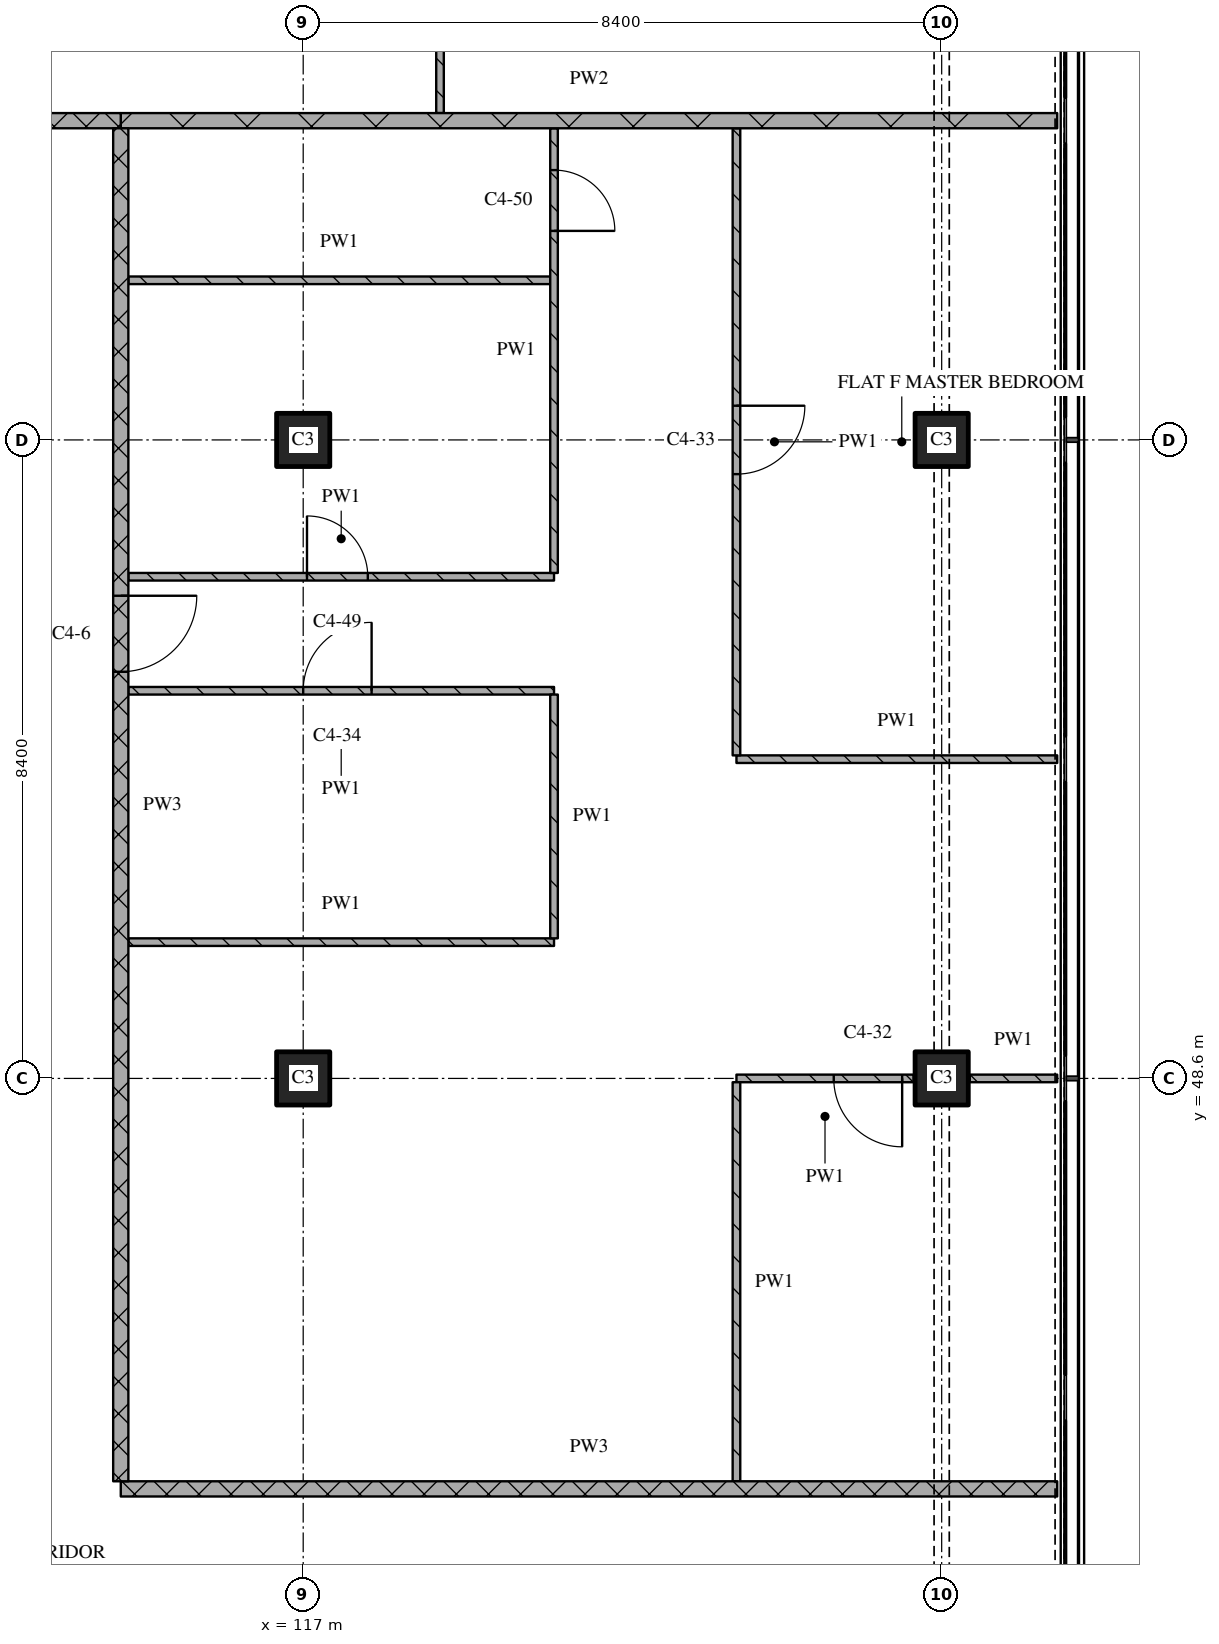
"""IFC4 building model, lengths in metres.
Left out: names, types, materials, properties, quantities, classifications, styles, units other than length and angle.
Written with IfcOpenShell. Run it as: python <this file> out.ifc"""

import sys

from ifc_helpers import new_model, si_unit, direction, frame, frame_2d, origin, origin_2d, place, context, subcontext, project, spatial, rectangle, extrude, element, fill, save


model = new_model("IFC4")
c1 = context("Model", 3, precision=1e-05, world=origin(), true_north=direction((0.0, 1.0)))
c2 = subcontext(c1, "Body", "Model", "MODEL_VIEW")
j1 = project(units=[si_unit("LENGTHUNIT", "METRE"), si_unit("PLANEANGLEUNIT", "RADIAN")], contexts=[c1])
p1 = place(None, origin())
s1 = spatial("IfcSite", under=j1, at=p1, CompositionType="ELEMENT")
p2 = place(p1, origin())
s2 = spatial("IfcBuilding", under=s1, at=p2, CompositionType="ELEMENT")
p3 = place(p2, frame((0.0, 0.0, 183.45)))
s3 = spatial("IfcBuildingStorey", under=s2, at=p3, CompositionType="ELEMENT", Elevation=183.45)
for number, where, z_axis, x_axis in (
    (1, (117.0, 48.6, 0.0), (0.0, 0.0, 1.0), (1.0, 0.0, 0.0)),
    (2, (117.0, 57.0, 0.0), (0.0, 0.0, 1.0), (1.0, 0.0, 0.0)),
    (3, (125.4, 48.6, 0.0), (0.0, 0.0, 1.0), (1.0, 0.0, 0.0)),
    (4, (125.4, 57.0, 0.0), (0.0, 0.0, 1.0), (1.0, 0.0, 0.0)),
):
    element("IfcColumn", number, at=place(p3, frame(where, z_axis=z_axis, x_axis=x_axis)), inside=s3, PredefinedType="COLUMN", context=c2, shape_type="SweptSolid", body=[
        extrude(rectangle(XDim=0.7, YDim=0.7, at=origin_2d()), origin(), (0.0, 0.0, 1.0), 3.6),
    ])
p4 = place(p3, frame((114.6, 43.2, 0.0), z_axis=(0.0, 0.0, 1.0), x_axis=(1.0, 0.0, 0.0)))
e5 = element("IfcWall", 5, at=p4, inside=s3, PredefinedType="PARTITIONING", context=c2, shape_type="SweptSolid", body=[
    extrude(rectangle(XDim=12.32, YDim=0.2, at=frame_2d((6.16, 0.0))), origin(), (0.0, 0.0, 1.0), 3.32),
])
p5 = place(p3, frame((125.03, 48.6, 0.0), z_axis=(0.0, 0.0, 1.0), x_axis=(-1.0, 0.0, 0.0)))
e6 = element("IfcWall", 6, at=p5, inside=s3, PredefinedType="PARTITIONING", context=c2, shape_type="SweptSolid", body=[
    extrude(rectangle(XDim=2.33, YDim=0.1, at=frame_2d((1.165, 0.0))), origin(), (0.0, 0.0, 1.0), 3.32),
])
p6 = place(p5, frame((0.15, 0.0, 0.0)))
e7 = element("IfcOpeningElement", 7, at=p6, cuts=e6, PredefinedType="OPENING", context=c2, shape_type="SweptSolid", body=[
    extrude(rectangle(XDim=0.9, YDim=2.1, at=frame_2d((0.45, 1.05))), frame((0.0, 0.06, 0.0), z_axis=(0.0, -1.0, 0.0), x_axis=(1.0, 0.0, 0.0)), (0.0, 0.0, 1.0), 0.12),
])
p7 = place(p3, frame((125.77, 48.6, 0.0), z_axis=(0.0, 0.0, 1.0), x_axis=(1.0, 0.0, 0.0)))
e8 = element("IfcWall", 8, at=p7, inside=s3, PredefinedType="PARTITIONING", context=c2, shape_type="SweptSolid", body=[
    extrude(rectangle(XDim=1.15, YDim=0.1, at=frame_2d((0.575, 0.0))), origin(), (0.0, 0.0, 1.0), 3.32),
])
p8 = place(p3, frame((114.7, 50.393, 0.0), z_axis=(0.0, 0.0, 1.0), x_axis=(1.0, 0.0, 0.0)))
e9 = element("IfcWall", 9, at=p8, inside=s3, PredefinedType="PARTITIONING", context=c2, shape_type="SweptSolid", body=[
    extrude(rectangle(XDim=5.6, YDim=0.1, at=frame_2d((2.8, 0.0))), origin(), (0.0, 0.0, 1.0), 3.32),
])
p9 = place(p3, frame((122.7, 52.8, 0.0), z_axis=(0.0, 0.0, 1.0), x_axis=(1.0, 0.0, 0.0)))
e10 = element("IfcWall", 10, at=p9, inside=s3, PredefinedType="PARTITIONING", context=c2, shape_type="SweptSolid", body=[
    extrude(rectangle(XDim=4.22, YDim=0.1, at=frame_2d((2.11, 0.0))), origin(), (0.0, 0.0, 1.0), 3.32),
])
p10 = place(p3, frame((120.3, 53.7, 0.0), z_axis=(0.0, 0.0, 1.0), x_axis=(-1.0, 0.0, 0.0)))
e11 = element("IfcWall", 11, at=p10, inside=s3, PredefinedType="PARTITIONING", context=c2, shape_type="SweptSolid", body=[
    extrude(rectangle(XDim=5.6, YDim=0.1, at=frame_2d((2.8, 0.0))), origin(), (0.0, 0.0, 1.0), 3.32),
])
p11 = place(p10, frame((2.4, 0.0, 0.0)))
e12 = element("IfcOpeningElement", 12, at=p11, cuts=e11, PredefinedType="OPENING", context=c2, shape_type="SweptSolid", body=[
    extrude(rectangle(XDim=0.9, YDim=2.1, at=frame_2d((0.45, 1.05))), frame((0.0, 0.06, 0.0), z_axis=(0.0, -1.0, 0.0), x_axis=(1.0, 0.0, 0.0)), (0.0, 0.0, 1.0), 0.12),
])
p12 = place(p3, frame((114.7, 55.2, 0.0), z_axis=(0.0, 0.0, 1.0), x_axis=(1.0, 0.0, 0.0)))
e13 = element("IfcWall", 13, at=p12, inside=s3, PredefinedType="PARTITIONING", context=c2, shape_type="SweptSolid", body=[
    extrude(rectangle(XDim=5.6, YDim=0.1, at=frame_2d((2.8, 0.0))), origin(), (0.0, 0.0, 1.0), 3.32),
])
p13 = place(p12, frame((2.35, 0.0, 0.0)))
e14 = element("IfcOpeningElement", 14, at=p13, cuts=e13, PredefinedType="OPENING", context=c2, shape_type="SweptSolid", body=[
    extrude(rectangle(XDim=0.8, YDim=2.1, at=frame_2d((0.4, 1.05))), frame((0.0, 0.06, 0.0), z_axis=(0.0, -1.0, 0.0), x_axis=(1.0, 0.0, 0.0)), (0.0, 0.0, 1.0), 0.12),
])
p14 = place(p3, frame((114.7, 59.1, 0.0), z_axis=(0.0, 0.0, 1.0), x_axis=(1.0, 0.0, 0.0)))
e15 = element("IfcWall", 15, at=p14, inside=s3, PredefinedType="PARTITIONING", context=c2, shape_type="SweptSolid", body=[
    extrude(rectangle(XDim=5.55, YDim=0.1, at=frame_2d((2.775, 0.0))), origin(), (0.0, 0.0, 1.0), 3.32),
])
p15 = place(p3, frame((111.0, 61.2, 0.0), z_axis=(0.0, 0.0, 1.0), x_axis=(1.0, 0.0, 0.0)))
e16 = element("IfcWall", 16, at=p15, inside=s3, PredefinedType="PARTITIONING", context=c2, shape_type="SweptSolid", body=[
    extrude(rectangle(XDim=3.6, YDim=0.2, at=frame_2d((1.8, 0.0))), origin(), (0.0, 0.0, 1.0), 3.32),
])
p16 = place(p3, frame((114.6, 61.2, 0.0), z_axis=(0.0, 0.0, 1.0), x_axis=(1.0, 0.0, 0.0)))
e17 = element("IfcWall", 17, at=p16, inside=s3, PredefinedType="PARTITIONING", context=c2, shape_type="SweptSolid", body=[
    extrude(rectangle(XDim=12.32, YDim=0.2, at=frame_2d((6.16, 0.0))), origin(), (0.0, 0.0, 1.0), 3.32),
])
p17 = place(p3, frame((114.6, 61.1, 0.0), z_axis=(0.0, 0.0, 1.0), x_axis=(0.0, -1.0, 0.0)))
e18 = element("IfcWall", 18, at=p17, inside=s3, PredefinedType="PARTITIONING", context=c2, shape_type="SweptSolid", body=[
    extrude(rectangle(XDim=17.8, YDim=0.2, at=frame_2d((8.9, 0.0))), origin(), (0.0, 0.0, 1.0), 3.32),
])
p18 = place(p17, frame((6.15, 0.0, 0.0)))
e19 = element("IfcOpeningElement", 19, at=p18, cuts=e18, PredefinedType="OPENING", context=c2, shape_type="SweptSolid", body=[
    extrude(rectangle(XDim=1.0, YDim=2.1, at=frame_2d((0.5, 1.05))), frame((0.0, 0.11, 0.0), z_axis=(0.0, -1.0, 0.0), x_axis=(1.0, 0.0, 0.0)), (0.0, 0.0, 1.0), 0.22),
])
p19 = place(p3, frame((118.8, 61.3, 0.0), z_axis=(0.0, 0.0, 1.0), x_axis=(0.0, 1.0, 0.0)))
e20 = element("IfcWall", 20, at=p19, inside=s3, PredefinedType="PARTITIONING", context=c2, shape_type="SweptSolid", body=[
    extrude(rectangle(XDim=3.15, YDim=0.1, at=frame_2d((1.575, 0.0))), origin(), (0.0, 0.0, 1.0), 3.32),
])
p20 = place(p19, frame((1.15, 0.0, 0.0)))
e21 = element("IfcOpeningElement", 21, at=p20, cuts=e20, PredefinedType="OPENING", context=c2, shape_type="SweptSolid", body=[
    extrude(rectangle(XDim=0.8, YDim=2.1, at=frame_2d((0.4, 1.05))), frame((0.0, 0.06, 0.0), z_axis=(0.0, -1.0, 0.0), x_axis=(1.0, 0.0, 0.0)), (0.0, 0.0, 1.0), 0.12),
])
p21 = place(p3, frame((120.3, 53.65, 0.0), z_axis=(0.0, 0.0, 1.0), x_axis=(0.0, -1.0, 0.0)))
e22 = element("IfcWall", 22, at=p21, inside=s3, PredefinedType="PARTITIONING", context=c2, shape_type="SweptSolid", body=[
    extrude(rectangle(XDim=3.207, YDim=0.1, at=frame_2d((1.604, 0.0))), origin(), (0.0, 0.0, 1.0), 3.32),
])
p22 = place(p3, frame((120.3, 55.25, 0.0), z_axis=(0.0, 0.0, 1.0), x_axis=(0.0, 1.0, 0.0)))
e23 = element("IfcWall", 23, at=p22, inside=s3, PredefinedType="PARTITIONING", context=c2, shape_type="SweptSolid", body=[
    extrude(rectangle(XDim=5.85, YDim=0.1, at=frame_2d((2.925, 0.0))), origin(), (0.0, 0.0, 1.0), 3.32),
])
p23 = place(p22, frame((4.5, 0.0, 0.0)))
e24 = element("IfcOpeningElement", 24, at=p23, cuts=e23, PredefinedType="OPENING", context=c2, shape_type="SweptSolid", body=[
    extrude(rectangle(XDim=0.8, YDim=2.1, at=frame_2d((0.4, 1.05))), frame((0.0, 0.06, 0.0), z_axis=(0.0, -1.0, 0.0), x_axis=(1.0, 0.0, 0.0)), (0.0, 0.0, 1.0), 0.12),
])
p24 = place(p3, frame((122.7, 48.55, 0.0), z_axis=(0.0, 0.0, 1.0), x_axis=(0.0, -1.0, 0.0)))
e25 = element("IfcWall", 25, at=p24, inside=s3, PredefinedType="PARTITIONING", context=c2, shape_type="SweptSolid", body=[
    extrude(rectangle(XDim=5.25, YDim=0.1, at=frame_2d((2.625, 0.0))), origin(), (0.0, 0.0, 1.0), 3.32),
])
p25 = place(p3, frame((122.7, 61.1, 0.0), z_axis=(0.0, 0.0, 1.0), x_axis=(0.0, -1.0, 0.0)))
e26 = element("IfcWall", 26, at=p25, inside=s3, PredefinedType="PARTITIONING", context=c2, shape_type="SweptSolid", body=[
    extrude(rectangle(XDim=8.25, YDim=0.1, at=frame_2d((4.125, 0.0))), origin(), (0.0, 0.0, 1.0), 3.32),
])
p26 = place(p25, frame((3.65, 0.0, 0.0)))
e27 = element("IfcOpeningElement", 27, at=p26, cuts=e26, PredefinedType="OPENING", context=c2, shape_type="SweptSolid", body=[
    extrude(rectangle(XDim=0.9, YDim=2.1, at=frame_2d((0.45, 1.05))), frame((0.0, 0.06, 0.0), z_axis=(0.0, -1.0, 0.0), x_axis=(1.0, 0.0, 0.0)), (0.0, 0.0, 1.0), 0.12),
])
p27 = place(p6, origin())
e28 = element("IfcDoor", 28, at=p27, inside=s3, OperationType="SINGLE_SWING_LEFT", PredefinedType="DOOR", context=c2, shape_type="SweptSolid", body=[
    extrude(rectangle(XDim=0.9, YDim=2.1, at=frame_2d((0.45, 1.05))), frame((0.0, 0.025, 0.0), z_axis=(0.0, -1.0, 0.0), x_axis=(1.0, 0.0, 0.0)), (0.0, 0.0, 1.0), 0.05),
])
fill(e7, e28)
p28 = place(p11, origin())
e29 = element("IfcDoor", 29, at=p28, inside=s3, OperationType="SINGLE_SWING_RIGHT", PredefinedType="DOOR", context=c2, shape_type="SweptSolid", body=[
    extrude(rectangle(XDim=0.9, YDim=2.1, at=frame_2d((0.45, 1.05))), frame((0.0, 0.025, 0.0), z_axis=(0.0, -1.0, 0.0), x_axis=(1.0, 0.0, 0.0)), (0.0, 0.0, 1.0), 0.05),
])
fill(e12, e29)
p29 = place(p13, origin())
e30 = element("IfcDoor", 30, at=p29, inside=s3, OperationType="SINGLE_SWING_LEFT", PredefinedType="DOOR", context=c2, shape_type="SweptSolid", body=[
    extrude(rectangle(XDim=0.8, YDim=2.1, at=frame_2d((0.4, 1.05))), frame((0.0, 0.025, 0.0), z_axis=(0.0, -1.0, 0.0), x_axis=(1.0, 0.0, 0.0)), (0.0, 0.0, 1.0), 0.05),
])
fill(e14, e30)
p30 = place(p18, origin())
e31 = element("IfcDoor", 31, at=p30, inside=s3, OperationType="SINGLE_SWING_LEFT", PredefinedType="DOOR", context=c2, shape_type="SweptSolid", body=[
    extrude(rectangle(XDim=1.0, YDim=2.1, at=frame_2d((0.5, 1.05))), frame((0.0, 0.025, 0.0), z_axis=(0.0, -1.0, 0.0), x_axis=(1.0, 0.0, 0.0)), (0.0, 0.0, 1.0), 0.05),
])
fill(e19, e31)
p31 = place(p23, origin())
e32 = element("IfcDoor", 32, at=p31, inside=s3, OperationType="SINGLE_SWING_RIGHT", PredefinedType="DOOR", context=c2, shape_type="SweptSolid", body=[
    extrude(rectangle(XDim=0.8, YDim=2.1, at=frame_2d((0.4, 1.05))), frame((0.0, 0.025, 0.0), z_axis=(0.0, -1.0, 0.0), x_axis=(1.0, 0.0, 0.0)), (0.0, 0.0, 1.0), 0.05),
])
fill(e24, e32)
p32 = place(p26, origin())
e33 = element("IfcDoor", 33, at=p32, inside=s3, OperationType="SINGLE_SWING_LEFT", PredefinedType="DOOR", context=c2, shape_type="SweptSolid", body=[
    extrude(rectangle(XDim=0.9, YDim=2.1, at=frame_2d((0.45, 1.05))), frame((0.0, 0.025, 0.0), z_axis=(0.0, -1.0, 0.0), x_axis=(1.0, 0.0, 0.0)), (0.0, 0.0, 1.0), 0.05),
])
fill(e27, e33)
save(model, sys.argv[1])
